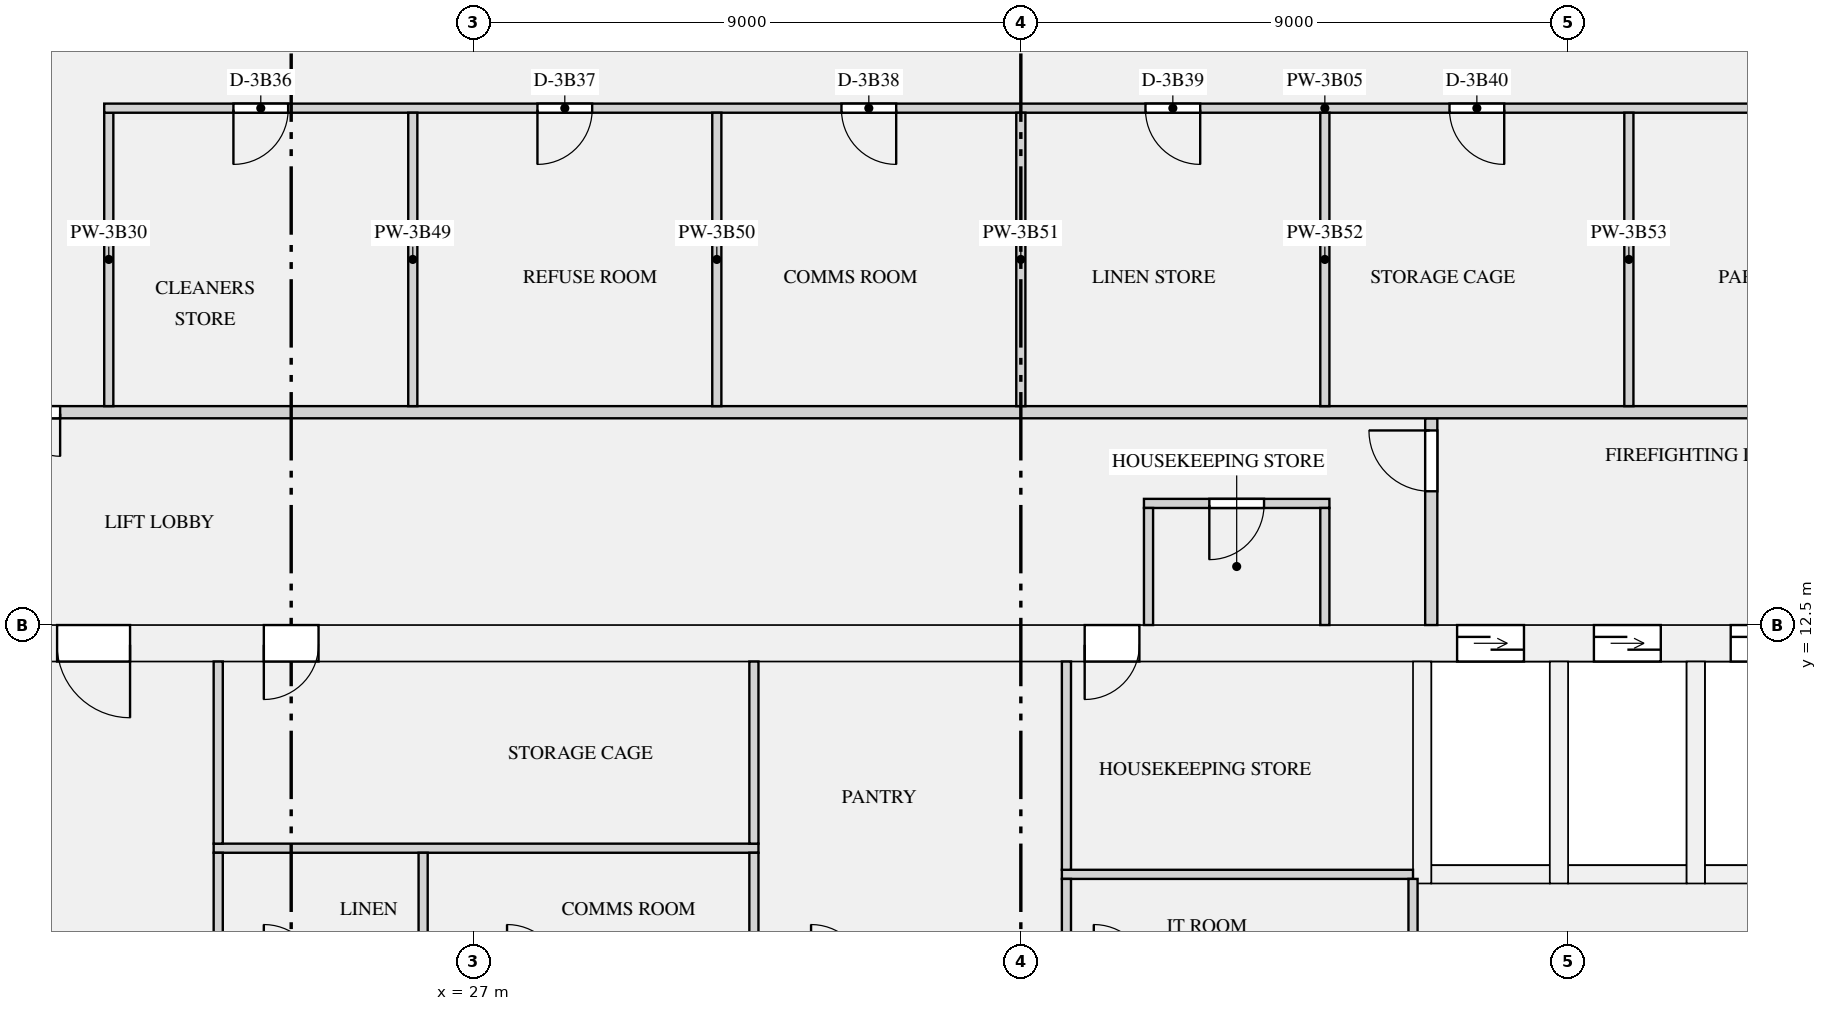
"""IFC4 building model, lengths in metres.
Left out: names, types, materials, properties, quantities, classifications, styles, units other than length and angle.
Written with IfcOpenShell. Run it as: python <this file> out.ifc"""

import sys

from ifc_helpers import new_model, si_unit, direction, frame, frame_2d, origin, place, context, subcontext, project, spatial, rectangle, extrude, element, fill, save


model = new_model("IFC4")
c1 = context("Model", 3, precision=1e-05, world=origin(), true_north=direction((0.0, 1.0)))
c2 = subcontext(c1, "Body", "Model", "MODEL_VIEW")
j1 = project(units=[si_unit("LENGTHUNIT", "METRE"), si_unit("PLANEANGLEUNIT", "RADIAN")], contexts=[c1])
p1 = place(None, origin())
s1 = spatial("IfcSite", under=j1, at=p1, CompositionType="ELEMENT")
p2 = place(p1, origin())
s2 = spatial("IfcBuilding", under=s1, at=p2, CompositionType="ELEMENT")
p3 = place(p2, frame((0.0, 0.0, 150.75)))
s3 = spatial("IfcBuildingStorey", under=s2, at=p3, CompositionType="ELEMENT", Elevation=150.75)
p4 = place(p3, frame((18.7, 12.2, 0.0), z_axis=(0.0, 0.0, 1.0), x_axis=(1.0, 0.0, 0.0)))
e1 = element("IfcWall", 1, at=p4, inside=s3, PredefinedType="SHEAR", context=c2, shape_type="SweptSolid", body=[
    extrude(rectangle(XDim=34.6, YDim=0.6, at=frame_2d((17.3, 0.0))), origin(), (0.0, 0.0, 1.0), 3.15),
])
p5 = place(p4, frame((24.475, 0.0, 0.0)))
e2 = element("IfcOpeningElement", 2, at=p5, cuts=e1, PredefinedType="OPENING", context=c2, shape_type="SweptSolid", body=[
    extrude(rectangle(XDim=1.1, YDim=2.1, at=frame_2d((0.55, 1.05))), frame((0.0, 0.31, 0.0), z_axis=(0.0, -1.0, 0.0), x_axis=(1.0, 0.0, 0.0)), (0.0, 0.0, 1.0), 0.62),
])
p6 = place(p4, frame((26.725, 0.0, 0.0)))
e3 = element("IfcOpeningElement", 3, at=p6, cuts=e1, PredefinedType="OPENING", context=c2, shape_type="SweptSolid", body=[
    extrude(rectangle(XDim=1.1, YDim=2.1, at=frame_2d((0.55, 1.05))), frame((0.0, 0.31, 0.0), z_axis=(0.0, -1.0, 0.0), x_axis=(1.0, 0.0, 0.0)), (0.0, 0.0, 1.0), 0.62),
])
p7 = place(p4, frame((28.975, 0.0, 0.0)))
e4 = element("IfcOpeningElement", 4, at=p7, cuts=e1, PredefinedType="OPENING", context=c2, shape_type="SweptSolid", body=[
    extrude(rectangle(XDim=1.1, YDim=2.1, at=frame_2d((0.55, 1.05))), frame((0.0, 0.31, 0.0), z_axis=(0.0, -1.0, 0.0), x_axis=(1.0, 0.0, 0.0)), (0.0, 0.0, 1.0), 0.62),
])
p8 = place(p4, frame((4.85, 0.0, 0.0)))
e5 = element("IfcOpeningElement", 5, at=p8, cuts=e1, PredefinedType="OPENING", context=c2, shape_type="SweptSolid", body=[
    extrude(rectangle(XDim=0.9, YDim=2.1, at=frame_2d((0.45, 1.05))), frame((0.0, 0.31, 0.0), z_axis=(0.0, -1.0, 0.0), x_axis=(1.0, 0.0, 0.0)), (0.0, 0.0, 1.0), 0.62),
])
p9 = place(p4, frame((18.35, 0.0, 0.0)))
e6 = element("IfcOpeningElement", 6, at=p9, cuts=e1, PredefinedType="OPENING", context=c2, shape_type="SweptSolid", body=[
    extrude(rectangle(XDim=0.9, YDim=2.1, at=frame_2d((0.45, 1.05))), frame((0.0, 0.31, 0.0), z_axis=(0.0, -1.0, 0.0), x_axis=(1.0, 0.0, 0.0)), (0.0, 0.0, 1.0), 0.62),
])
p10 = place(p4, frame((1.45, 0.0, 0.0)))
e7 = element("IfcOpeningElement", 7, at=p10, cuts=e1, PredefinedType="OPENING", context=c2, shape_type="SweptSolid", body=[
    extrude(rectangle(XDim=1.2, YDim=2.1, at=frame_2d((0.6, 1.05))), frame((0.0, 0.31, 0.0), z_axis=(0.0, -1.0, 0.0), x_axis=(1.0, 0.0, 0.0)), (0.0, 0.0, 1.0), 0.62),
])
p11 = place(p4, frame((31.95, 0.0, 0.0)))
e8 = element("IfcOpeningElement", 8, at=p11, cuts=e1, PredefinedType="OPENING", context=c2, shape_type="SweptSolid", body=[
    extrude(rectangle(XDim=1.2, YDim=2.1, at=frame_2d((0.6, 1.05))), frame((0.0, 0.31, 0.0), z_axis=(0.0, -1.0, 0.0), x_axis=(1.0, 0.0, 0.0)), (0.0, 0.0, 1.0), 0.62),
])
p12 = place(p3, frame((42.75, 8.4, 0.0), z_axis=(0.0, 0.0, 1.0), x_axis=(1.0, 0.0, 0.0)))
e9 = element("IfcWall", 9, at=p12, inside=s3, PredefinedType="SHEAR", context=c2, shape_type="SweptSolid", body=[
    extrude(rectangle(XDim=1.95, YDim=0.3, at=frame_2d((0.975, 0.0))), origin(), (0.0, 0.0, 1.0), 3.15),
])
p13 = place(p3, frame((42.6, 8.25, 0.0), z_axis=(0.0, 0.0, 1.0), x_axis=(0.0, 1.0, 0.0)))
e10 = element("IfcWall", 10, at=p13, inside=s3, PredefinedType="SHEAR", context=c2, shape_type="SweptSolid", body=[
    extrude(rectangle(XDim=3.65, YDim=0.3, at=frame_2d((1.825, 0.0))), origin(), (0.0, 0.0, 1.0), 3.15),
])
p14 = place(p3, frame((45.0, 8.4, 0.0), z_axis=(0.0, 0.0, 1.0), x_axis=(1.0, 0.0, 0.0)))
e11 = element("IfcWall", 11, at=p14, inside=s3, PredefinedType="SHEAR", context=c2, shape_type="SweptSolid", body=[
    extrude(rectangle(XDim=1.95, YDim=0.3, at=frame_2d((0.975, 0.0))), origin(), (0.0, 0.0, 1.0), 3.15),
])
p15 = place(p3, frame((44.85, 8.25, 0.0), z_axis=(0.0, 0.0, 1.0), x_axis=(0.0, 1.0, 0.0)))
e12 = element("IfcWall", 12, at=p15, inside=s3, PredefinedType="SHEAR", context=c2, shape_type="SweptSolid", body=[
    extrude(rectangle(XDim=3.65, YDim=0.3, at=frame_2d((1.825, 0.0))), origin(), (0.0, 0.0, 1.0), 3.15),
])
p16 = place(p3, frame((47.25, 8.4, 0.0), z_axis=(0.0, 0.0, 1.0), x_axis=(1.0, 0.0, 0.0)))
e13 = element("IfcWall", 13, at=p16, inside=s3, PredefinedType="SHEAR", context=c2, shape_type="SweptSolid", body=[
    extrude(rectangle(XDim=1.95, YDim=0.3, at=frame_2d((0.975, 0.0))), origin(), (0.0, 0.0, 1.0), 3.15),
])
p17 = place(p3, frame((47.1, 8.25, 0.0), z_axis=(0.0, 0.0, 1.0), x_axis=(0.0, 1.0, 0.0)))
e14 = element("IfcWall", 14, at=p17, inside=s3, PredefinedType="SHEAR", context=c2, shape_type="SweptSolid", body=[
    extrude(rectangle(XDim=3.65, YDim=0.3, at=frame_2d((1.825, 0.0))), origin(), (0.0, 0.0, 1.0), 3.15),
])
p18 = place(p3, frame((36.675, 8.4, 0.0), z_axis=(0.0, 0.0, 1.0), x_axis=(1.0, 0.0, 0.0)))
e15 = element("IfcWall", 15, at=p18, inside=s3, PredefinedType="PARTITIONING", context=c2, shape_type="SweptSolid", body=[
    extrude(rectangle(XDim=5.775, YDim=0.15, at=frame_2d((2.887, 0.0))), origin(), (0.0, 0.0, 1.0), 2.83),
])
p19 = place(p3, frame((22.725, 8.83, 0.0), z_axis=(0.0, 0.0, 1.0), x_axis=(1.0, 0.0, 0.0)))
e16 = element("IfcWall", 16, at=p19, inside=s3, PredefinedType="PARTITIONING", context=c2, shape_type="SweptSolid", body=[
    extrude(rectangle(XDim=8.96, YDim=0.15, at=frame_2d((4.48, 0.0))), origin(), (0.0, 0.0, 1.0), 2.83),
])
p20 = place(p3, frame((38.025, 14.5, 0.0), z_axis=(0.0, 0.0, 1.0), x_axis=(1.0, 0.0, 0.0)))
e17 = element("IfcWall", 17, at=p20, inside=s3, PredefinedType="PARTITIONING", context=c2, shape_type="SweptSolid", body=[
    extrude(rectangle(XDim=3.05, YDim=0.15, at=frame_2d((1.525, 0.0))), origin(), (0.0, 0.0, 1.0), 2.83),
])
p21 = place(p20, frame((1.075, 0.0, 0.0)))
e18 = element("IfcOpeningElement", 18, at=p21, cuts=e17, PredefinedType="OPENING", context=c2, shape_type="SweptSolid", body=[
    extrude(rectangle(XDim=0.9, YDim=2.1, at=frame_2d((0.45, 1.05))), frame((0.0, 0.085, 0.0), z_axis=(0.0, -1.0, 0.0), x_axis=(1.0, 0.0, 0.0)), (0.0, 0.0, 1.0), 0.17),
])
p22 = place(p3, frame((42.45, 6.65, 0.0), z_axis=(0.0, 0.0, 1.0), x_axis=(0.0, 1.0, 0.0)))
e19 = element("IfcWall", 19, at=p22, inside=s3, PredefinedType="PARTITIONING", context=c2, shape_type="SweptSolid", body=[
    extrude(rectangle(XDim=1.675, YDim=0.15, at=frame_2d((0.837, 0.0))), origin(), (0.0, 0.0, 1.0), 2.83),
])
for number, where, z_axis, x_axis in (
    (20, (22.8, 6.725, 0.0), (0.0, 0.0, 1.0), (0.0, 1.0, 0.0)),
    (21, (26.17, 6.725, 0.0), (0.0, 0.0, 1.0), (0.0, 1.0, 0.0)),
    (22, (31.61, 6.725, 0.0), (0.0, 0.0, 1.0), (0.0, 1.0, 0.0)),
):
    element("IfcWall", number, at=place(p3, frame(where, z_axis=z_axis, x_axis=x_axis)), inside=s3, PredefinedType="PARTITIONING", context=c2, shape_type="SweptSolid", body=[
        extrude(rectangle(XDim=2.03, YDim=0.15, at=frame_2d((1.015, 0.0))), origin(), (0.0, 0.0, 1.0), 2.83),
    ])
p23 = place(p3, frame((36.75, 6.725, 0.0), z_axis=(0.0, 0.0, 1.0), x_axis=(0.0, 1.0, 0.0)))
e23 = element("IfcWall", 23, at=p23, inside=s3, PredefinedType="PARTITIONING", context=c2, shape_type="SweptSolid", body=[
    extrude(rectangle(XDim=1.6, YDim=0.15, at=frame_2d((0.8, 0.0))), origin(), (0.0, 0.0, 1.0), 2.83),
])
p24 = place(p3, frame((36.75, 8.475, 0.0), z_axis=(0.0, 0.0, 1.0), x_axis=(0.0, 1.0, 0.0)))
e24 = element("IfcWall", 24, at=p24, inside=s3, PredefinedType="PARTITIONING", context=c2, shape_type="SweptSolid", body=[
    extrude(rectangle(XDim=3.425, YDim=0.15, at=frame_2d((1.712, 0.0))), origin(), (0.0, 0.0, 1.0), 2.83),
])
for number, where, z_axis, x_axis in (
    (25, (22.8, 8.905, 0.0), (0.0, 0.0, 1.0), (0.0, 1.0, 0.0)),
    (26, (31.61, 8.905, 0.0), (0.0, 0.0, 1.0), (0.0, 1.0, 0.0)),
):
    element("IfcWall", number, at=place(p3, frame(where, z_axis=z_axis, x_axis=x_axis)), inside=s3, PredefinedType="PARTITIONING", context=c2, shape_type="SweptSolid", body=[
        extrude(rectangle(XDim=2.995, YDim=0.15, at=frame_2d((1.498, 0.0))), origin(), (0.0, 0.0, 1.0), 2.83),
    ])
for number, where, z_axis, x_axis in (
    (27, (38.1, 12.5, 0.0), (0.0, 0.0, 1.0), (0.0, 1.0, 0.0)),
    (28, (41.0, 12.5, 0.0), (0.0, 0.0, 1.0), (0.0, 1.0, 0.0)),
):
    element("IfcWall", number, at=place(p3, frame(where, z_axis=z_axis, x_axis=x_axis)), inside=s3, PredefinedType="PARTITIONING", context=c2, shape_type="SweptSolid", body=[
        extrude(rectangle(XDim=1.925, YDim=0.15, at=frame_2d((0.962, 0.0))), origin(), (0.0, 0.0, 1.0), 2.83),
    ])
p25 = place(p3, frame((42.75, 12.5, 0.0), z_axis=(0.0, 0.0, 1.0), x_axis=(0.0, 1.0, 0.0)))
e29 = element("IfcWall", 29, at=p25, inside=s3, PredefinedType="PARTITIONING", context=c2, shape_type="SweptSolid", body=[
    extrude(rectangle(XDim=3.4, YDim=0.2, at=frame_2d((1.7, 0.0))), origin(), (0.0, 0.0, 1.0), 2.83),
])
p26 = place(p25, frame((2.2, 0.0, 0.0)))
e30 = element("IfcOpeningElement", 30, at=p26, cuts=e29, PredefinedType="OPENING", context=c2, shape_type="SweptSolid", body=[
    extrude(rectangle(XDim=1.0, YDim=2.1, at=frame_2d((0.5, 1.05))), frame((0.0, 0.11, 0.0), z_axis=(0.0, -1.0, 0.0), x_axis=(1.0, 0.0, 0.0)), (0.0, 0.0, 1.0), 0.22),
])
p27 = place(p3, frame((20.925, 21.0, 0.0), z_axis=(0.0, 0.0, 1.0), x_axis=(1.0, 0.0, 0.0)))
e31 = element("IfcWall", 31, at=p27, inside=s3, PredefinedType="PARTITIONING", context=c2, shape_type="SweptSolid", body=[
    extrude(rectangle(XDim=30.15, YDim=0.15, at=frame_2d((15.075, 0.0))), origin(), (0.0, 0.0, 1.0), 2.83),
])
p28 = place(p27, frame((2.125, 0.0, 0.0)))
e32 = element("IfcOpeningElement", 32, at=p28, cuts=e31, PredefinedType="OPENING", context=c2, shape_type="SweptSolid", body=[
    extrude(rectangle(XDim=0.9, YDim=2.1, at=frame_2d((0.45, 1.05))), frame((0.0, 0.085, 0.0), z_axis=(0.0, -1.0, 0.0), x_axis=(1.0, 0.0, 0.0)), (0.0, 0.0, 1.0), 0.17),
])
p29 = place(p27, frame((7.125, 0.0, 0.0)))
e33 = element("IfcOpeningElement", 33, at=p29, cuts=e31, PredefinedType="OPENING", context=c2, shape_type="SweptSolid", body=[
    extrude(rectangle(XDim=0.9, YDim=2.1, at=frame_2d((0.45, 1.05))), frame((0.0, 0.085, 0.0), z_axis=(0.0, -1.0, 0.0), x_axis=(1.0, 0.0, 0.0)), (0.0, 0.0, 1.0), 0.17),
])
p30 = place(p27, frame((12.125, 0.0, 0.0)))
e34 = element("IfcOpeningElement", 34, at=p30, cuts=e31, PredefinedType="OPENING", context=c2, shape_type="SweptSolid", body=[
    extrude(rectangle(XDim=0.9, YDim=2.1, at=frame_2d((0.45, 1.05))), frame((0.0, 0.085, 0.0), z_axis=(0.0, -1.0, 0.0), x_axis=(1.0, 0.0, 0.0)), (0.0, 0.0, 1.0), 0.17),
])
p31 = place(p27, frame((17.125, 0.0, 0.0)))
e35 = element("IfcOpeningElement", 35, at=p31, cuts=e31, PredefinedType="OPENING", context=c2, shape_type="SweptSolid", body=[
    extrude(rectangle(XDim=0.9, YDim=2.1, at=frame_2d((0.45, 1.05))), frame((0.0, 0.085, 0.0), z_axis=(0.0, -1.0, 0.0), x_axis=(1.0, 0.0, 0.0)), (0.0, 0.0, 1.0), 0.17),
])
p32 = place(p27, frame((22.125, 0.0, 0.0)))
e36 = element("IfcOpeningElement", 36, at=p32, cuts=e31, PredefinedType="OPENING", context=c2, shape_type="SweptSolid", body=[
    extrude(rectangle(XDim=0.9, YDim=2.1, at=frame_2d((0.45, 1.05))), frame((0.0, 0.085, 0.0), z_axis=(0.0, -1.0, 0.0), x_axis=(1.0, 0.0, 0.0)), (0.0, 0.0, 1.0), 0.17),
])
p33 = place(p27, frame((27.125, 0.0, 0.0)))
e37 = element("IfcOpeningElement", 37, at=p33, cuts=e31, PredefinedType="OPENING", context=c2, shape_type="SweptSolid", body=[
    extrude(rectangle(XDim=0.9, YDim=2.1, at=frame_2d((0.45, 1.05))), frame((0.0, 0.085, 0.0), z_axis=(0.0, -1.0, 0.0), x_axis=(1.0, 0.0, 0.0)), (0.0, 0.0, 1.0), 0.17),
])
p34 = place(p3, frame((17.9, 16.0, 0.0), z_axis=(0.0, 0.0, 1.0), x_axis=(1.0, 0.0, 0.0)))
e38 = element("IfcWall", 38, at=p34, inside=s3, PredefinedType="PARTITIONING", context=c2, shape_type="SweptSolid", body=[
    extrude(rectangle(XDim=36.2, YDim=0.2, at=frame_2d((18.1, 0.0))), origin(), (0.0, 0.0, 1.0), 2.83),
])
p35 = place(p34, frame((0.9, 0.0, 0.0)))
e39 = element("IfcOpeningElement", 39, at=p35, cuts=e38, PredefinedType="OPENING", context=c2, shape_type="SweptSolid", body=[
    extrude(rectangle(XDim=1.4, YDim=2.1, at=frame_2d((0.7, 1.05))), frame((0.0, 0.11, 0.0), z_axis=(0.0, -1.0, 0.0), x_axis=(1.0, 0.0, 0.0)), (0.0, 0.0, 1.0), 0.22),
])
p36 = place(p34, frame((33.9, 0.0, 0.0)))
e40 = element("IfcOpeningElement", 40, at=p36, cuts=e38, PredefinedType="OPENING", context=c2, shape_type="SweptSolid", body=[
    extrude(rectangle(XDim=1.4, YDim=2.1, at=frame_2d((0.7, 1.05))), frame((0.0, 0.11, 0.0), z_axis=(0.0, -1.0, 0.0), x_axis=(1.0, 0.0, 0.0)), (0.0, 0.0, 1.0), 0.22),
])
for number, where, z_axis, x_axis in (
    (41, (21.0, 16.1, 0.0), (0.0, 0.0, 1.0), (0.0, 1.0, 0.0)),
    (42, (26.0, 16.1, 0.0), (0.0, 0.0, 1.0), (0.0, 1.0, 0.0)),
    (43, (31.0, 16.1, 0.0), (0.0, 0.0, 1.0), (0.0, 1.0, 0.0)),
    (44, (36.0, 16.1, 0.0), (0.0, 0.0, 1.0), (0.0, 1.0, 0.0)),
    (45, (41.0, 16.1, 0.0), (0.0, 0.0, 1.0), (0.0, 1.0, 0.0)),
    (46, (46.0, 16.1, 0.0), (0.0, 0.0, 1.0), (0.0, 1.0, 0.0)),
):
    element("IfcWall", number, at=place(p3, frame(where, z_axis=z_axis, x_axis=x_axis)), inside=s3, PredefinedType="PARTITIONING", context=c2, shape_type="SweptSolid", body=[
        extrude(rectangle(XDim=4.825, YDim=0.15, at=frame_2d((2.413, 0.0))), origin(), (0.0, 0.0, 1.0), 2.83),
    ])
p37 = place(p5, origin())
e47 = element("IfcDoor", 47, at=p37, inside=s3, OperationType="DOUBLE_DOOR_SLIDING", PredefinedType="DOOR", context=c2, shape_type="SweptSolid", body=[
    extrude(rectangle(XDim=1.1, YDim=2.1, at=frame_2d((0.55, 1.05))), frame((0.0, 0.025, 0.0), z_axis=(0.0, -1.0, 0.0), x_axis=(1.0, 0.0, 0.0)), (0.0, 0.0, 1.0), 0.05),
])
fill(e2, e47)
p38 = place(p6, origin())
e48 = element("IfcDoor", 48, at=p38, inside=s3, OperationType="DOUBLE_DOOR_SLIDING", PredefinedType="DOOR", context=c2, shape_type="SweptSolid", body=[
    extrude(rectangle(XDim=1.1, YDim=2.1, at=frame_2d((0.55, 1.05))), frame((0.0, 0.025, 0.0), z_axis=(0.0, -1.0, 0.0), x_axis=(1.0, 0.0, 0.0)), (0.0, 0.0, 1.0), 0.05),
])
fill(e3, e48)
p39 = place(p7, origin())
e49 = element("IfcDoor", 49, at=p39, inside=s3, OperationType="DOUBLE_DOOR_SLIDING", PredefinedType="DOOR", context=c2, shape_type="SweptSolid", body=[
    extrude(rectangle(XDim=1.1, YDim=2.1, at=frame_2d((0.55, 1.05))), frame((0.0, 0.025, 0.0), z_axis=(0.0, -1.0, 0.0), x_axis=(1.0, 0.0, 0.0)), (0.0, 0.0, 1.0), 0.05),
])
fill(e4, e49)
p40 = place(p21, frame((0.9, 0.0, 0.0), z_axis=(0.0, 0.0, 1.0), x_axis=(-1.0, 0.0, 0.0)))
e50 = element("IfcDoor", 50, at=p40, inside=s3, OperationType="SINGLE_SWING_RIGHT", PredefinedType="DOOR", context=c2, shape_type="SweptSolid", body=[
    extrude(rectangle(XDim=0.9, YDim=2.1, at=frame_2d((0.45, 1.05))), frame((0.0, 0.025, 0.0), z_axis=(0.0, -1.0, 0.0), x_axis=(1.0, 0.0, 0.0)), (0.0, 0.0, 1.0), 0.05),
])
fill(e18, e50)
p41 = place(p8, frame((0.9, 0.0, 0.0), z_axis=(0.0, 0.0, 1.0), x_axis=(-1.0, 0.0, 0.0)))
e51 = element("IfcDoor", 51, at=p41, inside=s3, OperationType="SINGLE_SWING_RIGHT", PredefinedType="DOOR", context=c2, shape_type="SweptSolid", body=[
    extrude(rectangle(XDim=0.9, YDim=2.1, at=frame_2d((0.45, 1.05))), frame((0.0, 0.025, 0.0), z_axis=(0.0, -1.0, 0.0), x_axis=(1.0, 0.0, 0.0)), (0.0, 0.0, 1.0), 0.05),
])
fill(e5, e51)
p42 = place(p9, frame((0.9, 0.0, 0.0), z_axis=(0.0, 0.0, 1.0), x_axis=(-1.0, 0.0, 0.0)))
e52 = element("IfcDoor", 52, at=p42, inside=s3, OperationType="SINGLE_SWING_RIGHT", PredefinedType="DOOR", context=c2, shape_type="SweptSolid", body=[
    extrude(rectangle(XDim=0.9, YDim=2.1, at=frame_2d((0.45, 1.05))), frame((0.0, 0.025, 0.0), z_axis=(0.0, -1.0, 0.0), x_axis=(1.0, 0.0, 0.0)), (0.0, 0.0, 1.0), 0.05),
])
fill(e6, e52)
p43 = place(p10, frame((1.2, 0.0, 0.0), z_axis=(0.0, 0.0, 1.0), x_axis=(-1.0, 0.0, 0.0)))
e53 = element("IfcDoor", 53, at=p43, inside=s3, OperationType="SINGLE_SWING_LEFT", PredefinedType="DOOR", context=c2, shape_type="SweptSolid", body=[
    extrude(rectangle(XDim=1.2, YDim=2.1, at=frame_2d((0.6, 1.05))), frame((0.0, 0.025, 0.0), z_axis=(0.0, -1.0, 0.0), x_axis=(1.0, 0.0, 0.0)), (0.0, 0.0, 1.0), 0.05),
])
fill(e7, e53)
p44 = place(p26, origin())
e54 = element("IfcDoor", 54, at=p44, inside=s3, OperationType="SINGLE_SWING_RIGHT", PredefinedType="DOOR", context=c2, shape_type="SweptSolid", body=[
    extrude(rectangle(XDim=1.0, YDim=2.1, at=frame_2d((0.5, 1.05))), frame((0.0, 0.025, 0.0), z_axis=(0.0, -1.0, 0.0), x_axis=(1.0, 0.0, 0.0)), (0.0, 0.0, 1.0), 0.05),
])
fill(e30, e54)
p45 = place(p35, frame((1.4, 0.0, 0.0), z_axis=(0.0, 0.0, 1.0), x_axis=(-1.0, 0.0, 0.0)))
e55 = element("IfcDoor", 55, at=p45, inside=s3, OperationType="DOUBLE_DOOR_SINGLE_SWING", PredefinedType="DOOR", context=c2, shape_type="SweptSolid", body=[
    extrude(rectangle(XDim=1.4, YDim=2.1, at=frame_2d((0.7, 1.05))), frame((0.0, 0.025, 0.0), z_axis=(0.0, -1.0, 0.0), x_axis=(1.0, 0.0, 0.0)), (0.0, 0.0, 1.0), 0.05),
])
fill(e39, e55)
p46 = place(p28, frame((0.9, 0.0, 0.0), z_axis=(0.0, 0.0, 1.0), x_axis=(-1.0, 0.0, 0.0)))
e56 = element("IfcDoor", 56, at=p46, inside=s3, OperationType="SINGLE_SWING_RIGHT", PredefinedType="DOOR", context=c2, shape_type="SweptSolid", body=[
    extrude(rectangle(XDim=0.9, YDim=2.1, at=frame_2d((0.45, 1.05))), frame((0.0, 0.025, 0.0), z_axis=(0.0, -1.0, 0.0), x_axis=(1.0, 0.0, 0.0)), (0.0, 0.0, 1.0), 0.05),
])
fill(e32, e56)
p47 = place(p29, frame((0.9, 0.0, 0.0), z_axis=(0.0, 0.0, 1.0), x_axis=(-1.0, 0.0, 0.0)))
e57 = element("IfcDoor", 57, at=p47, inside=s3, OperationType="SINGLE_SWING_RIGHT", PredefinedType="DOOR", context=c2, shape_type="SweptSolid", body=[
    extrude(rectangle(XDim=0.9, YDim=2.1, at=frame_2d((0.45, 1.05))), frame((0.0, 0.025, 0.0), z_axis=(0.0, -1.0, 0.0), x_axis=(1.0, 0.0, 0.0)), (0.0, 0.0, 1.0), 0.05),
])
fill(e33, e57)
p48 = place(p30, frame((0.9, 0.0, 0.0), z_axis=(0.0, 0.0, 1.0), x_axis=(-1.0, 0.0, 0.0)))
e58 = element("IfcDoor", 58, at=p48, inside=s3, OperationType="SINGLE_SWING_LEFT", PredefinedType="DOOR", context=c2, shape_type="SweptSolid", body=[
    extrude(rectangle(XDim=0.9, YDim=2.1, at=frame_2d((0.45, 1.05))), frame((0.0, 0.025, 0.0), z_axis=(0.0, -1.0, 0.0), x_axis=(1.0, 0.0, 0.0)), (0.0, 0.0, 1.0), 0.05),
])
fill(e34, e58)
p49 = place(p31, frame((0.9, 0.0, 0.0), z_axis=(0.0, 0.0, 1.0), x_axis=(-1.0, 0.0, 0.0)))
e59 = element("IfcDoor", 59, at=p49, inside=s3, OperationType="SINGLE_SWING_LEFT", PredefinedType="DOOR", context=c2, shape_type="SweptSolid", body=[
    extrude(rectangle(XDim=0.9, YDim=2.1, at=frame_2d((0.45, 1.05))), frame((0.0, 0.025, 0.0), z_axis=(0.0, -1.0, 0.0), x_axis=(1.0, 0.0, 0.0)), (0.0, 0.0, 1.0), 0.05),
])
fill(e35, e59)
p50 = place(p32, frame((0.9, 0.0, 0.0), z_axis=(0.0, 0.0, 1.0), x_axis=(-1.0, 0.0, 0.0)))
e60 = element("IfcDoor", 60, at=p50, inside=s3, OperationType="SINGLE_SWING_LEFT", PredefinedType="DOOR", context=c2, shape_type="SweptSolid", body=[
    extrude(rectangle(XDim=0.9, YDim=2.1, at=frame_2d((0.45, 1.05))), frame((0.0, 0.025, 0.0), z_axis=(0.0, -1.0, 0.0), x_axis=(1.0, 0.0, 0.0)), (0.0, 0.0, 1.0), 0.05),
])
fill(e36, e60)
save(model, sys.argv[1])
